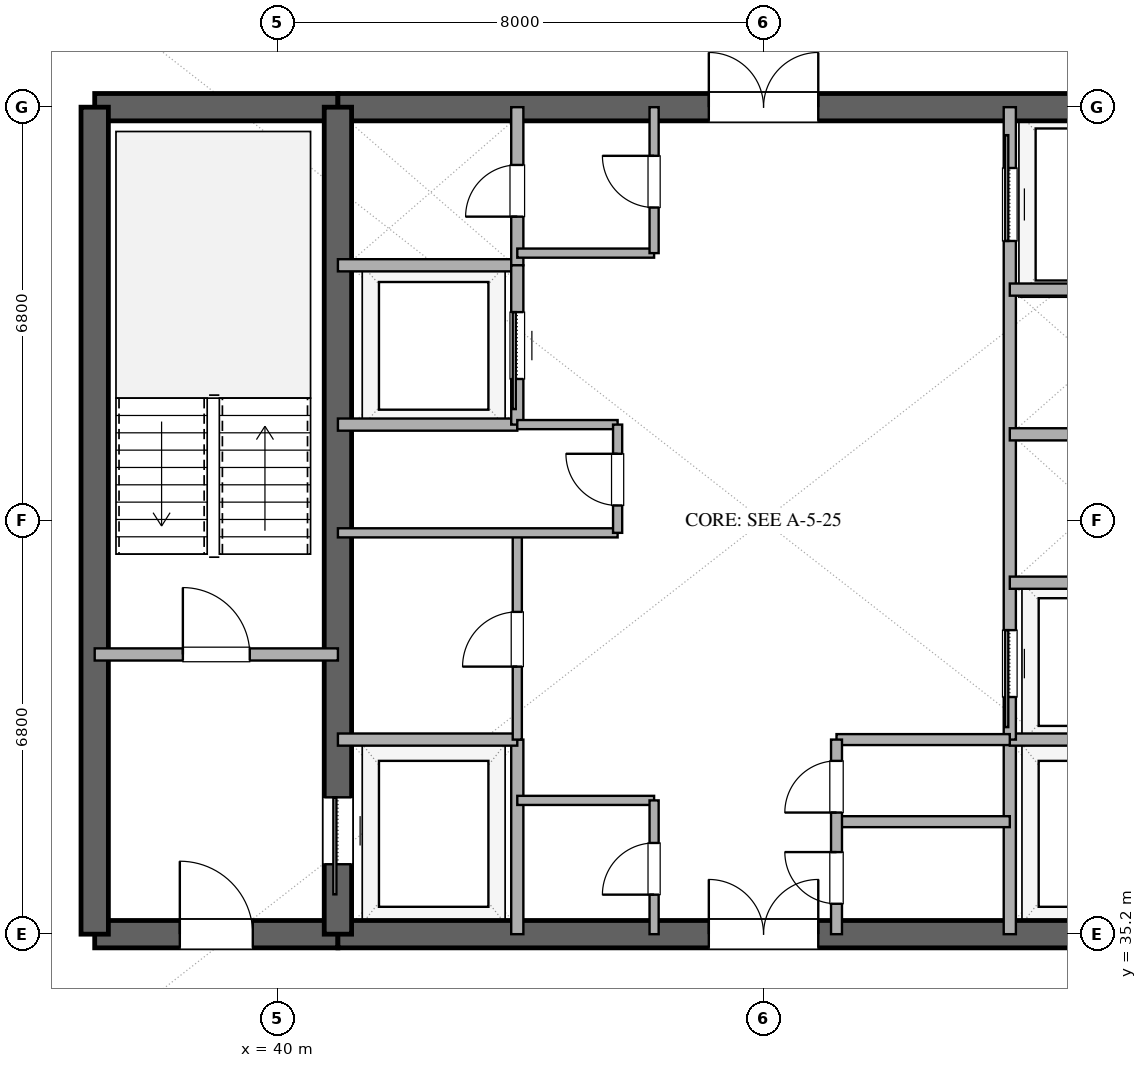
"""IFC4 building model, lengths in metres.
Left out: names, types, materials, properties, quantities, classifications, styles, units other than length and angle.
Written with IfcOpenShell. Run it as: python <this file> out.ifc"""

import sys

from ifc_helpers import new_model, si_unit, direction, frame, frame_2d, origin, place, context, subcontext, project, spatial, rectangle, extrude, element, fill, save


model = new_model("IFC4")
c1 = context("Model", 3, precision=1e-05, world=origin(), true_north=direction((0.0, 1.0)))
c2 = subcontext(c1, "Body", "Model", "MODEL_VIEW")
j1 = project(units=[si_unit("LENGTHUNIT", "METRE"), si_unit("PLANEANGLEUNIT", "RADIAN")], contexts=[c1])
p1 = place(None, origin())
s1 = spatial("IfcSite", under=j1, at=p1, CompositionType="ELEMENT")
p2 = place(p1, origin())
s2 = spatial("IfcBuilding", under=s1, at=p2, CompositionType="ELEMENT")
p3 = place(p2, frame((0.0, 0.0, 157.8)))
s3 = spatial("IfcBuildingStorey", under=s2, at=p3, CompositionType="ELEMENT", Elevation=157.8)
p4 = place(p3, frame((37.0, 35.2, 0.0), z_axis=(0.0, 0.0, 1.0), x_axis=(1.0, 0.0, 0.0)))
e1 = element("IfcWall", 1, at=p4, inside=s3, PredefinedType="SHEAR", context=c2, shape_type="SweptSolid", body=[
    extrude(rectangle(XDim=4.0, YDim=0.45, at=frame_2d((2.0, 0.0))), origin(), (0.0, 0.0, 1.0), 3.38),
])
p5 = place(p4, frame((1.4, 0.0, 0.0)))
e2 = element("IfcOpeningElement", 2, at=p5, cuts=e1, PredefinedType="OPENING", context=c2, shape_type="SweptSolid", body=[
    extrude(rectangle(XDim=1.2, YDim=2.15, at=frame_2d((0.6, 1.075))), frame((0.0, 0.235, 0.0), z_axis=(0.0, -1.0, 0.0), x_axis=(1.0, 0.0, 0.0)), (0.0, 0.0, 1.0), 0.47),
])
p6 = place(p3, frame((41.0, 35.2, 0.0), z_axis=(0.0, 0.0, 1.0), x_axis=(1.0, 0.0, 0.0)))
e3 = element("IfcWall", 3, at=p6, inside=s3, PredefinedType="SHEAR", context=c2, shape_type="SweptSolid", body=[
    extrude(rectangle(XDim=14.0, YDim=0.45, at=frame_2d((7.0, 0.0))), origin(), (0.0, 0.0, 1.0), 3.38),
])
p7 = place(p6, frame((6.1, 0.0, 0.0)))
e4 = element("IfcOpeningElement", 4, at=p7, cuts=e3, PredefinedType="OPENING", context=c2, shape_type="SweptSolid", body=[
    extrude(rectangle(XDim=1.8, YDim=2.25, at=frame_2d((0.9, 1.125))), frame((0.0, 0.235, 0.0), z_axis=(0.0, -1.0, 0.0), x_axis=(1.0, 0.0, 0.0)), (0.0, 0.0, 1.0), 0.47),
])
p8 = place(p3, frame((37.0, 48.8, 0.0), z_axis=(0.0, 0.0, 1.0), x_axis=(1.0, 0.0, 0.0)))
e5 = element("IfcWall", 5, at=p8, inside=s3, PredefinedType="SHEAR", context=c2, shape_type="SweptSolid", body=[
    extrude(rectangle(XDim=4.0, YDim=0.45, at=frame_2d((2.0, 0.0))), origin(), (0.0, 0.0, 1.0), 3.38),
])
p9 = place(p3, frame((41.0, 48.8, 0.0), z_axis=(0.0, 0.0, 1.0), x_axis=(1.0, 0.0, 0.0)))
e6 = element("IfcWall", 6, at=p9, inside=s3, PredefinedType="SHEAR", context=c2, shape_type="SweptSolid", body=[
    extrude(rectangle(XDim=14.0, YDim=0.45, at=frame_2d((7.0, 0.0))), origin(), (0.0, 0.0, 1.0), 3.38),
])
p10 = place(p9, frame((6.1, 0.0, 0.0)))
e7 = element("IfcOpeningElement", 7, at=p10, cuts=e6, PredefinedType="OPENING", context=c2, shape_type="SweptSolid", body=[
    extrude(rectangle(XDim=1.8, YDim=2.25, at=frame_2d((0.9, 1.125))), frame((0.0, 0.235, 0.0), z_axis=(0.0, -1.0, 0.0), x_axis=(1.0, 0.0, 0.0)), (0.0, 0.0, 1.0), 0.47),
])
p11 = place(p3, frame((37.0, 35.2, 0.0), z_axis=(0.0, 0.0, 1.0), x_axis=(0.0, 1.0, 0.0)))
e8 = element("IfcWall", 8, at=p11, inside=s3, PredefinedType="SHEAR", context=c2, shape_type="SweptSolid", body=[
    extrude(rectangle(XDim=13.6, YDim=0.45, at=frame_2d((6.8, 0.0))), origin(), (0.0, 0.0, 1.0), 3.38),
])
p12 = place(p3, frame((41.0, 35.2, 0.0), z_axis=(0.0, 0.0, 1.0), x_axis=(0.0, 1.0, 0.0)))
e9 = element("IfcWall", 9, at=p12, inside=s3, PredefinedType="SHEAR", context=c2, shape_type="SweptSolid", body=[
    extrude(rectangle(XDim=13.6, YDim=0.45, at=frame_2d((6.8, 0.0))), origin(), (0.0, 0.0, 1.0), 3.38),
])
p13 = place(p12, frame((1.15, 0.0, 0.0)))
e10 = element("IfcOpeningElement", 10, at=p13, cuts=e9, PredefinedType="OPENING", context=c2, shape_type="SweptSolid", body=[
    extrude(rectangle(XDim=1.1, YDim=2.2, at=frame_2d((0.55, 1.1))), frame((0.0, 0.235, 0.0), z_axis=(0.0, -1.0, 0.0), x_axis=(1.0, 0.0, 0.0)), (0.0, 0.0, 1.0), 0.47),
])
p14 = place(p3, frame((37.0, 39.8, 0.0), z_axis=(0.0, 0.0, 1.0), x_axis=(1.0, 0.0, 0.0)))
e11 = element("IfcWall", 11, at=p14, inside=s3, PredefinedType="SOLIDWALL", context=c2, shape_type="SweptSolid", body=[
    extrude(rectangle(XDim=4.0, YDim=0.2, at=frame_2d((2.0, 0.0))), origin(), (0.0, 0.0, 1.0), 2.74),
])
p15 = place(p14, frame((1.45, 0.0, 0.0)))
e12 = element("IfcOpeningElement", 12, at=p15, cuts=e11, PredefinedType="OPENING", context=c2, shape_type="SweptSolid", body=[
    extrude(rectangle(XDim=1.1, YDim=2.15, at=frame_2d((0.55, 1.075))), frame((0.0, 0.11, 0.0), z_axis=(0.0, -1.0, 0.0), x_axis=(1.0, 0.0, 0.0)), (0.0, 0.0, 1.0), 0.22),
])
p16 = place(p3, frame((43.95, 35.2, 0.0), z_axis=(0.0, 0.0, 1.0), x_axis=(0.0, 1.0, 0.0)))
e13 = element("IfcWall", 13, at=p16, inside=s3, PredefinedType="SOLIDWALL", context=c2, shape_type="SweptSolid", body=[
    extrude(rectangle(XDim=3.2, YDim=0.2, at=frame_2d((1.6, 0.0))), origin(), (0.0, 0.0, 1.0), 2.74),
])
p17 = place(p3, frame((41.0, 38.4, 0.0), z_axis=(0.0, 0.0, 1.0), x_axis=(1.0, 0.0, 0.0)))
e14 = element("IfcWall", 14, at=p17, inside=s3, PredefinedType="SOLIDWALL", context=c2, shape_type="SweptSolid", body=[
    extrude(rectangle(XDim=2.95, YDim=0.2, at=frame_2d((1.475, 0.0))), origin(), (0.0, 0.0, 1.0), 2.74),
])
p18 = place(p3, frame((52.05, 35.2, 0.0), z_axis=(0.0, 0.0, 1.0), x_axis=(0.0, 1.0, 0.0)))
e15 = element("IfcWall", 15, at=p18, inside=s3, PredefinedType="SOLIDWALL", context=c2, shape_type="SweptSolid", body=[
    extrude(rectangle(XDim=3.2, YDim=0.2, at=frame_2d((1.6, 0.0))), origin(), (0.0, 0.0, 1.0), 2.74),
])
for number, where, z_axis, x_axis in (
    (16, (52.05, 38.4, 0.0), (0.0, 0.0, 1.0), (1.0, 0.0, 0.0)),
    (17, (41.0, 46.2, 0.0), (0.0, 0.0, 1.0), (1.0, 0.0, 0.0)),
):
    element("IfcWall", number, at=place(p3, frame(where, z_axis=z_axis, x_axis=x_axis)), inside=s3, PredefinedType="SOLIDWALL", context=c2, shape_type="SweptSolid", body=[
        extrude(rectangle(XDim=2.95, YDim=0.2, at=frame_2d((1.475, 0.0))), origin(), (0.0, 0.0, 1.0), 2.74),
    ])
p19 = place(p3, frame((43.95, 46.2, 0.0), z_axis=(0.0, 0.0, 1.0), x_axis=(0.0, 1.0, 0.0)))
e18 = element("IfcWall", 18, at=p19, inside=s3, PredefinedType="SOLIDWALL", context=c2, shape_type="SweptSolid", body=[
    extrude(rectangle(XDim=2.6, YDim=0.2, at=frame_2d((1.3, 0.0))), origin(), (0.0, 0.0, 1.0), 2.74),
])
p20 = place(p19, frame((0.8, 0.0, 0.0)))
e19 = element("IfcOpeningElement", 19, at=p20, cuts=e18, PredefinedType="OPENING", context=c2, shape_type="SweptSolid", body=[
    extrude(rectangle(XDim=0.85, YDim=2.15, at=frame_2d((0.425, 1.075))), frame((0.0, 0.11, 0.0), z_axis=(0.0, -1.0, 0.0), x_axis=(1.0, 0.0, 0.0)), (0.0, 0.0, 1.0), 0.22),
])
p21 = place(p3, frame((41.0, 43.58, 0.0), z_axis=(0.0, 0.0, 1.0), x_axis=(1.0, 0.0, 0.0)))
e20 = element("IfcWall", 20, at=p21, inside=s3, PredefinedType="SOLIDWALL", context=c2, shape_type="SweptSolid", body=[
    extrude(rectangle(XDim=2.95, YDim=0.2, at=frame_2d((1.475, 0.0))), origin(), (0.0, 0.0, 1.0), 2.74),
])
p22 = place(p3, frame((43.95, 43.58, 0.0), z_axis=(0.0, 0.0, 1.0), x_axis=(0.0, 1.0, 0.0)))
e21 = element("IfcWall", 21, at=p22, inside=s3, PredefinedType="SOLIDWALL", context=c2, shape_type="SweptSolid", body=[
    extrude(rectangle(XDim=2.62, YDim=0.2, at=frame_2d((1.31, 0.0))), origin(), (0.0, 0.0, 1.0), 2.74),
])
p23 = place(p22, frame((0.75, 0.0, 0.0)))
e22 = element("IfcOpeningElement", 22, at=p23, cuts=e21, PredefinedType="OPENING", context=c2, shape_type="SweptSolid", body=[
    extrude(rectangle(XDim=1.1, YDim=2.2, at=frame_2d((0.55, 1.1))), frame((0.0, 0.11, 0.0), z_axis=(0.0, -1.0, 0.0), x_axis=(1.0, 0.0, 0.0)), (0.0, 0.0, 1.0), 0.22),
])
p24 = place(p3, frame((43.95, 38.4, 0.0), z_axis=(0.0, 0.0, 1.0), x_axis=(0.0, 1.0, 0.0)))
e23 = element("IfcWall", 23, at=p24, inside=s3, PredefinedType="PARTITIONING", context=c2, shape_type="SweptSolid", body=[
    extrude(rectangle(XDim=3.4, YDim=0.15, at=frame_2d((1.7, 0.0))), origin(), (0.0, 0.0, 1.0), 2.74),
])
p25 = place(p24, frame((1.2, 0.0, 0.0)))
e24 = element("IfcOpeningElement", 24, at=p25, cuts=e23, PredefinedType="OPENING", context=c2, shape_type="SweptSolid", body=[
    extrude(rectangle(XDim=0.9, YDim=2.15, at=frame_2d((0.45, 1.075))), frame((0.0, 0.085, 0.0), z_axis=(0.0, -1.0, 0.0), x_axis=(1.0, 0.0, 0.0)), (0.0, 0.0, 1.0), 0.17),
])
p26 = place(p3, frame((41.0, 41.8, 0.0), z_axis=(0.0, 0.0, 1.0), x_axis=(1.0, 0.0, 0.0)))
e25 = element("IfcWall", 25, at=p26, inside=s3, PredefinedType="PARTITIONING", context=c2, shape_type="SweptSolid", body=[
    extrude(rectangle(XDim=4.6, YDim=0.15, at=frame_2d((2.3, 0.0))), origin(), (0.0, 0.0, 1.0), 2.74),
])
p27 = place(p3, frame((43.95, 43.58, 0.0), z_axis=(0.0, 0.0, 1.0), x_axis=(1.0, 0.0, 0.0)))
e26 = element("IfcWall", 26, at=p27, inside=s3, PredefinedType="PARTITIONING", context=c2, shape_type="SweptSolid", body=[
    extrude(rectangle(XDim=1.65, YDim=0.15, at=frame_2d((0.825, 0.0))), origin(), (0.0, 0.0, 1.0), 2.74),
])
p28 = place(p3, frame((45.6, 41.8, 0.0), z_axis=(0.0, 0.0, 1.0), x_axis=(0.0, 1.0, 0.0)))
e27 = element("IfcWall", 27, at=p28, inside=s3, PredefinedType="PARTITIONING", context=c2, shape_type="SweptSolid", body=[
    extrude(rectangle(XDim=1.78, YDim=0.15, at=frame_2d((0.89, 0.0))), origin(), (0.0, 0.0, 1.0), 2.74),
])
p29 = place(p28, frame((0.45, 0.0, 0.0)))
e28 = element("IfcOpeningElement", 28, at=p29, cuts=e27, PredefinedType="OPENING", context=c2, shape_type="SweptSolid", body=[
    extrude(rectangle(XDim=0.85, YDim=2.15, at=frame_2d((0.425, 1.075))), frame((0.0, 0.085, 0.0), z_axis=(0.0, -1.0, 0.0), x_axis=(1.0, 0.0, 0.0)), (0.0, 0.0, 1.0), 0.17),
])
p30 = place(p3, frame((52.05, 38.4, 0.0), z_axis=(0.0, 0.0, 1.0), x_axis=(0.0, 1.0, 0.0)))
e29 = element("IfcWall", 29, at=p30, inside=s3, PredefinedType="SOLIDWALL", context=c2, shape_type="SweptSolid", body=[
    extrude(rectangle(XDim=10.4, YDim=0.2, at=frame_2d((5.2, 0.0))), origin(), (0.0, 0.0, 1.0), 2.74),
])
p31 = place(p30, frame((0.7, 0.0, 0.0)))
e30 = element("IfcOpeningElement", 30, at=p31, cuts=e29, PredefinedType="OPENING", context=c2, shape_type="SweptSolid", body=[
    extrude(rectangle(XDim=1.1, YDim=2.2, at=frame_2d((0.55, 1.1))), frame((0.0, 0.11, 0.0), z_axis=(0.0, -1.0, 0.0), x_axis=(1.0, 0.0, 0.0)), (0.0, 0.0, 1.0), 0.22),
])
p32 = place(p30, frame((8.2, 0.0, 0.0)))
e31 = element("IfcOpeningElement", 31, at=p32, cuts=e29, PredefinedType="OPENING", context=c2, shape_type="SweptSolid", body=[
    extrude(rectangle(XDim=1.2, YDim=2.2, at=frame_2d((0.6, 1.1))), frame((0.0, 0.11, 0.0), z_axis=(0.0, -1.0, 0.0), x_axis=(1.0, 0.0, 0.0)), (0.0, 0.0, 1.0), 0.22),
])
for number, where, z_axis, x_axis in (
    (32, (52.05, 40.98, 0.0), (0.0, 0.0, 1.0), (1.0, 0.0, 0.0)),
    (33, (52.05, 43.42, 0.0), (0.0, 0.0, 1.0), (1.0, 0.0, 0.0)),
    (34, (52.05, 45.8, 0.0), (0.0, 0.0, 1.0), (1.0, 0.0, 0.0)),
):
    element("IfcWall", number, at=place(p3, frame(where, z_axis=z_axis, x_axis=x_axis)), inside=s3, PredefinedType="SOLIDWALL", context=c2, shape_type="SweptSolid", body=[
        extrude(rectangle(XDim=2.95, YDim=0.2, at=frame_2d((1.475, 0.0))), origin(), (0.0, 0.0, 1.0), 2.74),
    ])
p33 = place(p3, frame((43.95, 37.4, 0.0), z_axis=(0.0, 0.0, 1.0), x_axis=(1.0, 0.0, 0.0)))
e35 = element("IfcWall", 35, at=p33, inside=s3, PredefinedType="PARTITIONING", context=c2, shape_type="SweptSolid", body=[
    extrude(rectangle(XDim=2.25, YDim=0.15, at=frame_2d((1.125, 0.0))), origin(), (0.0, 0.0, 1.0), 2.74),
])
p34 = place(p3, frame((46.2, 35.2, 0.0), z_axis=(0.0, 0.0, 1.0), x_axis=(0.0, 1.0, 0.0)))
e36 = element("IfcWall", 36, at=p34, inside=s3, PredefinedType="PARTITIONING", context=c2, shape_type="SweptSolid", body=[
    extrude(rectangle(XDim=2.2, YDim=0.15, at=frame_2d((1.1, 0.0))), origin(), (0.0, 0.0, 1.0), 2.74),
])
p35 = place(p34, frame((0.65, 0.0, 0.0)))
e37 = element("IfcOpeningElement", 37, at=p35, cuts=e36, PredefinedType="OPENING", context=c2, shape_type="SweptSolid", body=[
    extrude(rectangle(XDim=0.85, YDim=2.15, at=frame_2d((0.425, 1.075))), frame((0.0, 0.085, 0.0), z_axis=(0.0, -1.0, 0.0), x_axis=(1.0, 0.0, 0.0)), (0.0, 0.0, 1.0), 0.17),
])
p36 = place(p3, frame((43.95, 46.4, 0.0), z_axis=(0.0, 0.0, 1.0), x_axis=(1.0, 0.0, 0.0)))
e38 = element("IfcWall", 38, at=p36, inside=s3, PredefinedType="PARTITIONING", context=c2, shape_type="SweptSolid", body=[
    extrude(rectangle(XDim=2.25, YDim=0.15, at=frame_2d((1.125, 0.0))), origin(), (0.0, 0.0, 1.0), 2.74),
])
p37 = place(p3, frame((46.2, 46.4, 0.0), z_axis=(0.0, 0.0, 1.0), x_axis=(0.0, 1.0, 0.0)))
e39 = element("IfcWall", 39, at=p37, inside=s3, PredefinedType="PARTITIONING", context=c2, shape_type="SweptSolid", body=[
    extrude(rectangle(XDim=2.4, YDim=0.15, at=frame_2d((1.2, 0.0))), origin(), (0.0, 0.0, 1.0), 2.74),
])
p38 = place(p37, frame((0.75, 0.0, 0.0)))
e40 = element("IfcOpeningElement", 40, at=p38, cuts=e39, PredefinedType="OPENING", context=c2, shape_type="SweptSolid", body=[
    extrude(rectangle(XDim=0.85, YDim=2.15, at=frame_2d((0.425, 1.075))), frame((0.0, 0.085, 0.0), z_axis=(0.0, -1.0, 0.0), x_axis=(1.0, 0.0, 0.0)), (0.0, 0.0, 1.0), 0.17),
])
for number, where, z_axis, x_axis in (
    (41, (49.2, 37.05, 0.0), (0.0, 0.0, 1.0), (1.0, 0.0, 0.0)),
    (42, (49.2, 38.4, 0.0), (0.0, 0.0, 1.0), (1.0, 0.0, 0.0)),
):
    element("IfcWall", number, at=place(p3, frame(where, z_axis=z_axis, x_axis=x_axis)), inside=s3, PredefinedType="PLUMBINGWALL", context=c2, shape_type="SweptSolid", body=[
        extrude(rectangle(XDim=2.85, YDim=0.18, at=frame_2d((1.425, 0.0))), origin(), (0.0, 0.0, 1.0), 2.74),
    ])
p39 = place(p3, frame((49.2, 35.2, 0.0), z_axis=(0.0, 0.0, 1.0), x_axis=(0.0, 1.0, 0.0)))
e43 = element("IfcWall", 43, at=p39, inside=s3, PredefinedType="PLUMBINGWALL", context=c2, shape_type="SweptSolid", body=[
    extrude(rectangle(XDim=3.2, YDim=0.18, at=frame_2d((1.6, 0.0))), origin(), (0.0, 0.0, 1.0), 2.74),
])
p40 = place(p39, frame((0.5, 0.0, 0.0)))
e44 = element("IfcOpeningElement", 44, at=p40, cuts=e43, PredefinedType="OPENING", context=c2, shape_type="SweptSolid", body=[
    extrude(rectangle(XDim=0.85, YDim=2.1, at=frame_2d((0.425, 1.05))), frame((0.0, 0.1, 0.0), z_axis=(0.0, -1.0, 0.0), x_axis=(1.0, 0.0, 0.0)), (0.0, 0.0, 1.0), 0.2),
])
p41 = place(p39, frame((2.0, 0.0, 0.0)))
e45 = element("IfcOpeningElement", 45, at=p41, cuts=e43, PredefinedType="OPENING", context=c2, shape_type="SweptSolid", body=[
    extrude(rectangle(XDim=0.85, YDim=2.15, at=frame_2d((0.425, 1.075))), frame((0.0, 0.1, 0.0), z_axis=(0.0, -1.0, 0.0), x_axis=(1.0, 0.0, 0.0)), (0.0, 0.0, 1.0), 0.2),
])
p42 = place(p13, origin())
e46 = element("IfcDoor", 46, at=p42, inside=s3, OperationType="SLIDING_TO_LEFT", PredefinedType="DOOR", context=c2, shape_type="SweptSolid", body=[
    extrude(rectangle(XDim=1.1, YDim=2.2, at=frame_2d((0.55, 1.1))), frame((0.0, 0.025, 0.0), z_axis=(0.0, -1.0, 0.0), x_axis=(1.0, 0.0, 0.0)), (0.0, 0.0, 1.0), 0.05),
])
fill(e10, e46)
p43 = place(p5, origin())
e47 = element("IfcDoor", 47, at=p43, inside=s3, OperationType="SINGLE_SWING_LEFT", PredefinedType="DOOR", context=c2, shape_type="SweptSolid", body=[
    extrude(rectangle(XDim=1.2, YDim=2.15, at=frame_2d((0.6, 1.075))), frame((0.0, 0.025, 0.0), z_axis=(0.0, -1.0, 0.0), x_axis=(1.0, 0.0, 0.0)), (0.0, 0.0, 1.0), 0.05),
])
fill(e2, e47)
p44 = place(p7, origin())
e48 = element("IfcDoor", 48, at=p44, inside=s3, OperationType="DOUBLE_DOOR_SINGLE_SWING", PredefinedType="DOOR", context=c2, shape_type="SweptSolid", body=[
    extrude(rectangle(XDim=1.8, YDim=2.25, at=frame_2d((0.9, 1.125))), frame((0.0, 0.025, 0.0), z_axis=(0.0, -1.0, 0.0), x_axis=(1.0, 0.0, 0.0)), (0.0, 0.0, 1.0), 0.05),
])
fill(e4, e48)
p45 = place(p10, origin())
e49 = element("IfcDoor", 49, at=p45, inside=s3, OperationType="DOUBLE_DOOR_SINGLE_SWING", PredefinedType="DOOR", context=c2, shape_type="SweptSolid", body=[
    extrude(rectangle(XDim=1.8, YDim=2.25, at=frame_2d((0.9, 1.125))), frame((0.0, 0.025, 0.0), z_axis=(0.0, -1.0, 0.0), x_axis=(1.0, 0.0, 0.0)), (0.0, 0.0, 1.0), 0.05),
])
fill(e7, e49)
p46 = place(p15, origin())
e50 = element("IfcDoor", 50, at=p46, inside=s3, OperationType="SINGLE_SWING_LEFT", PredefinedType="DOOR", context=c2, shape_type="SweptSolid", body=[
    extrude(rectangle(XDim=1.1, YDim=2.15, at=frame_2d((0.55, 1.075))), frame((0.0, 0.025, 0.0), z_axis=(0.0, -1.0, 0.0), x_axis=(1.0, 0.0, 0.0)), (0.0, 0.0, 1.0), 0.05),
])
fill(e12, e50)
p47 = place(p20, origin())
e51 = element("IfcDoor", 51, at=p47, inside=s3, OperationType="SINGLE_SWING_LEFT", PredefinedType="DOOR", context=c2, shape_type="SweptSolid", body=[
    extrude(rectangle(XDim=0.85, YDim=2.15, at=frame_2d((0.425, 1.075))), frame((0.0, 0.025, 0.0), z_axis=(0.0, -1.0, 0.0), x_axis=(1.0, 0.0, 0.0)), (0.0, 0.0, 1.0), 0.05),
])
fill(e19, e51)
p48 = place(p23, origin())
e52 = element("IfcDoor", 52, at=p48, inside=s3, OperationType="SLIDING_TO_LEFT", PredefinedType="DOOR", context=c2, shape_type="SweptSolid", body=[
    extrude(rectangle(XDim=1.1, YDim=2.2, at=frame_2d((0.55, 1.1))), frame((0.0, 0.025, 0.0), z_axis=(0.0, -1.0, 0.0), x_axis=(1.0, 0.0, 0.0)), (0.0, 0.0, 1.0), 0.05),
])
fill(e22, e52)
p49 = place(p25, origin())
e53 = element("IfcDoor", 53, at=p49, inside=s3, OperationType="SINGLE_SWING_LEFT", PredefinedType="DOOR", context=c2, shape_type="SweptSolid", body=[
    extrude(rectangle(XDim=0.9, YDim=2.15, at=frame_2d((0.45, 1.075))), frame((0.0, 0.025, 0.0), z_axis=(0.0, -1.0, 0.0), x_axis=(1.0, 0.0, 0.0)), (0.0, 0.0, 1.0), 0.05),
])
fill(e24, e53)
p50 = place(p29, origin())
e54 = element("IfcDoor", 54, at=p50, inside=s3, OperationType="SINGLE_SWING_RIGHT", PredefinedType="DOOR", context=c2, shape_type="SweptSolid", body=[
    extrude(rectangle(XDim=0.85, YDim=2.15, at=frame_2d((0.425, 1.075))), frame((0.0, 0.025, 0.0), z_axis=(0.0, -1.0, 0.0), x_axis=(1.0, 0.0, 0.0)), (0.0, 0.0, 1.0), 0.05),
])
fill(e28, e54)
p51 = place(p31, origin())
e55 = element("IfcDoor", 55, at=p51, inside=s3, OperationType="SLIDING_TO_LEFT", PredefinedType="DOOR", context=c2, shape_type="SweptSolid", body=[
    extrude(rectangle(XDim=1.1, YDim=2.2, at=frame_2d((0.55, 1.1))), frame((0.0, 0.025, 0.0), z_axis=(0.0, -1.0, 0.0), x_axis=(1.0, 0.0, 0.0)), (0.0, 0.0, 1.0), 0.05),
])
fill(e30, e55)
p52 = place(p32, origin())
e56 = element("IfcDoor", 56, at=p52, inside=s3, OperationType="SLIDING_TO_RIGHT", PredefinedType="DOOR", context=c2, shape_type="SweptSolid", body=[
    extrude(rectangle(XDim=1.2, YDim=2.2, at=frame_2d((0.6, 1.1))), frame((0.0, 0.025, 0.0), z_axis=(0.0, -1.0, 0.0), x_axis=(1.0, 0.0, 0.0)), (0.0, 0.0, 1.0), 0.05),
])
fill(e31, e56)
p53 = place(p35, origin())
e57 = element("IfcDoor", 57, at=p53, inside=s3, OperationType="SINGLE_SWING_LEFT", PredefinedType="DOOR", context=c2, shape_type="SweptSolid", body=[
    extrude(rectangle(XDim=0.85, YDim=2.15, at=frame_2d((0.425, 1.075))), frame((0.0, 0.025, 0.0), z_axis=(0.0, -1.0, 0.0), x_axis=(1.0, 0.0, 0.0)), (0.0, 0.0, 1.0), 0.05),
])
fill(e37, e57)
p54 = place(p38, origin())
e58 = element("IfcDoor", 58, at=p54, inside=s3, OperationType="SINGLE_SWING_RIGHT", PredefinedType="DOOR", context=c2, shape_type="SweptSolid", body=[
    extrude(rectangle(XDim=0.85, YDim=2.15, at=frame_2d((0.425, 1.075))), frame((0.0, 0.025, 0.0), z_axis=(0.0, -1.0, 0.0), x_axis=(1.0, 0.0, 0.0)), (0.0, 0.0, 1.0), 0.05),
])
fill(e40, e58)
p55 = place(p40, origin())
e59 = element("IfcDoor", 59, at=p55, inside=s3, OperationType="SINGLE_SWING_RIGHT", PredefinedType="DOOR", context=c2, shape_type="SweptSolid", body=[
    extrude(rectangle(XDim=0.85, YDim=2.1, at=frame_2d((0.425, 1.05))), frame((0.0, 0.025, 0.0), z_axis=(0.0, -1.0, 0.0), x_axis=(1.0, 0.0, 0.0)), (0.0, 0.0, 1.0), 0.05),
])
fill(e44, e59)
p56 = place(p41, origin())
e60 = element("IfcDoor", 60, at=p56, inside=s3, OperationType="SINGLE_SWING_LEFT", PredefinedType="DOOR", context=c2, shape_type="SweptSolid", body=[
    extrude(rectangle(XDim=0.85, YDim=2.15, at=frame_2d((0.425, 1.075))), frame((0.0, 0.025, 0.0), z_axis=(0.0, -1.0, 0.0), x_axis=(1.0, 0.0, 0.0)), (0.0, 0.0, 1.0), 0.05),
])
fill(e45, e60)
save(model, sys.argv[1])
